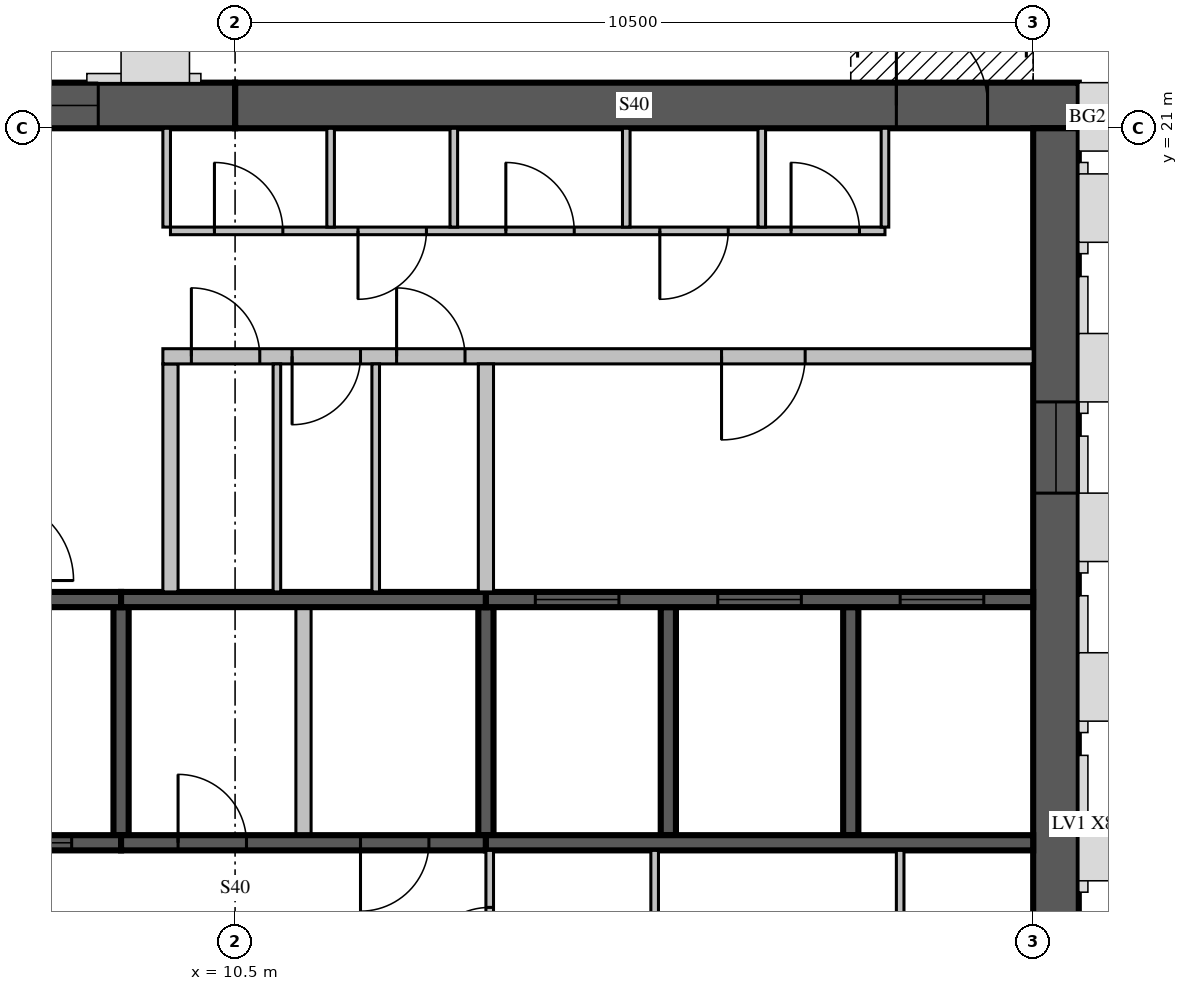
"""IFC4 building model, lengths in metres.
Left out: names, types, materials, properties, quantities, classifications, styles, units other than length and angle.
Written with IfcOpenShell. Run it as: python <this file> out.ifc"""

import sys

from ifc_helpers import new_model, si_unit, direction, frame, frame_2d, origin, place, context, subcontext, project, spatial, rectangle, extrude, source, transform, mapped, element, fill, save


model = new_model("IFC4")
c1 = context("Model", 3, precision=1e-05, world=origin(), true_north=direction((0.0, 1.0)))
c2 = subcontext(c1, "Body", "Model", "MODEL_VIEW")
j1 = project(units=[si_unit("LENGTHUNIT", "METRE"), si_unit("PLANEANGLEUNIT", "RADIAN")], contexts=[c1])
p1 = place(None, origin())
s1 = spatial("IfcSite", under=j1, at=p1, CompositionType="ELEMENT")
p2 = place(p1, origin())
s2 = spatial("IfcBuilding", under=s1, at=p2, CompositionType="ELEMENT")
p3 = place(p2, frame((0.0, 0.0, 316.0)))
s3 = spatial("IfcBuildingStorey", under=s2, at=p3, CompositionType="ELEMENT", Elevation=316.0)
m1 = source(origin(), c2, "Body", "SweptSolid", [
    extrude(rectangle(XDim=11.1, YDim=0.6, at=frame_2d((5.55, 0.0))), origin(), (0.0, 0.0, 1.0), 3.5),
])
p4 = place(p3, frame((10.5, 21.3, 0.0), z_axis=(0.0, 0.0, 1.0), x_axis=(1.0, 0.0, 0.0)))
e1 = element("IfcWall", 1, at=p4, inside=s3, PredefinedType="SHEAR", context=c2, shape_type="MappedRepresentation", body=[
    mapped(m1, transform((0.0, 0.0, 0.0), scale=1.0)),
])
m2 = source(origin(), c2, "Body", "SweptSolid", [
    extrude(rectangle(XDim=1.2, YDim=2.1, at=frame_2d((0.6, 1.05))), frame((0.0, 0.31, 0.0), z_axis=(0.0, -1.0, 0.0), x_axis=(1.0, 0.0, 0.0)), (0.0, 0.0, 1.0), 0.62),
])
p5 = place(p4, frame((8.7, 0.0, 0.0)))
e2 = element("IfcOpeningElement", 2, at=p5, cuts=e1, PredefinedType="OPENING", context=c2, shape_type="MappedRepresentation", body=[
    mapped(m2, transform((0.0, 0.0, 0.0), scale=1.0)),
])
m3 = source(origin(), c2, "Body", "SweptSolid", [
    extrude(rectangle(XDim=10.5, YDim=0.6, at=frame_2d((5.25, 0.0))), origin(), (0.0, 0.0, 1.0), 3.5),
])
p6 = place(p3, frame((21.3, 10.5, 0.0), z_axis=(0.0, 0.0, 1.0), x_axis=(0.0, 1.0, 0.0)))
e3 = element("IfcWall", 3, at=p6, inside=s3, PredefinedType="SHEAR", context=c2, shape_type="MappedRepresentation", body=[
    mapped(m3, transform((0.0, 0.0, 0.0), scale=1.0)),
])
m4 = source(origin(), c2, "Body", "SweptSolid", [
    extrude(rectangle(XDim=1.2, YDim=2.4, at=frame_2d((0.6, 1.2))), frame((0.0, 0.31, 0.0), z_axis=(0.0, -1.0, 0.0), x_axis=(1.0, 0.0, 0.0)), (0.0, 0.0, 1.0), 0.62),
])
p7 = place(p6, frame((5.7, 0.0, 0.6)))
e4 = element("IfcOpeningElement", 4, at=p7, cuts=e3, PredefinedType="OPENING", context=c2, shape_type="MappedRepresentation", body=[
    mapped(m4, transform((0.0, 0.0, 0.0), scale=1.0)),
])
m5 = source(origin(), c2, "Body", "SweptSolid", [
    extrude(rectangle(XDim=6.6, YDim=0.6, at=frame_2d((3.3, 0.0))), origin(), (0.0, 0.0, 1.0), 3.5),
])
p8 = place(p3, frame((3.9, 21.3, 0.0), z_axis=(0.0, 0.0, 1.0), x_axis=(1.0, 0.0, 0.0)))
e5 = element("IfcWall", 5, at=p8, inside=s3, PredefinedType="SHEAR", context=c2, shape_type="MappedRepresentation", body=[
    mapped(m5, transform((0.0, 0.0, 0.0), scale=1.0)),
])
p9 = place(p8, frame((1.5, 0.0, 0.6)))
e6 = element("IfcOpeningElement", 6, at=p9, cuts=e5, PredefinedType="OPENING", context=c2, shape_type="MappedRepresentation", body=[
    mapped(m4, transform((0.0, 0.0, 0.0), scale=1.0)),
])
p10 = place(p8, frame((3.6, 0.0, 0.6)))
e7 = element("IfcOpeningElement", 7, at=p10, cuts=e5, PredefinedType="OPENING", context=c2, shape_type="MappedRepresentation", body=[
    mapped(m4, transform((0.0, 0.0, 0.0), scale=1.0)),
])
m6 = source(origin(), c2, "Body", "SweptSolid", [
    extrude(rectangle(XDim=3.0, YDim=0.2, at=frame_2d((1.5, 0.0))), origin(), (0.0, 0.0, 1.0), 3.1),
])
for number, where, z_axis, x_axis in (
    (8, (9.0, 11.7, 0.0), (0.0, 0.0, 1.0), (0.0, 1.0, 0.0)),
    (9, (13.8, 11.7, 0.0), (0.0, 0.0, 1.0), (0.0, 1.0, 0.0)),
):
    element("IfcWall", number, at=place(p3, frame(where, z_axis=z_axis, x_axis=x_axis)), inside=s3, PredefinedType="SOLIDWALL", context=c2, shape_type="MappedRepresentation", body=[
        mapped(m6, transform((0.0, 0.0, 0.0), scale=1.0)),
    ])
m7 = source(origin(), c2, "Body", "SweptSolid", [
    extrude(rectangle(XDim=3.0, YDim=0.2, at=frame_2d((1.5, 0.0))), origin(), (0.0, 0.0, 1.0), 3.5),
])
for number, where, z_axis, x_axis in (
    (10, (16.2, 11.7, 0.0), (0.0, 0.0, 1.0), (0.0, 1.0, 0.0)),
    (11, (18.6, 11.7, 0.0), (0.0, 0.0, 1.0), (0.0, 1.0, 0.0)),
):
    element("IfcWall", number, at=place(p3, frame(where, z_axis=z_axis, x_axis=x_axis)), inside=s3, PredefinedType="SOLIDWALL", context=c2, shape_type="MappedRepresentation", body=[
        mapped(m7, transform((0.0, 0.0, 0.0), scale=1.0)),
    ])
m8 = source(origin(), c2, "Body", "SweptSolid", [
    extrude(rectangle(XDim=3.0, YDim=0.2, at=frame_2d((1.5, 0.0))), origin(), (0.0, 0.0, 1.0), 3.1),
])
p11 = place(p3, frame((11.4, 11.7, 0.0), z_axis=(0.0, 0.0, 1.0), x_axis=(0.0, 1.0, 0.0)))
e12 = element("IfcWall", 12, at=p11, inside=s3, PredefinedType="PARTITIONING", context=c2, shape_type="MappedRepresentation", body=[
    mapped(m8, transform((0.0, 0.0, 0.0), scale=1.0)),
])
m9 = source(origin(), c2, "Body", "SweptSolid", [
    extrude(rectangle(XDim=4.8, YDim=0.2, at=frame_2d((2.4, 0.0))), origin(), (0.0, 0.0, 1.0), 3.5),
])
p12 = place(p3, frame((4.2, 11.6, 0.0), z_axis=(0.0, 0.0, 1.0), x_axis=(1.0, 0.0, 0.0)))
e13 = element("IfcWall", 13, at=p12, inside=s3, PredefinedType="SOLIDWALL", context=c2, shape_type="MappedRepresentation", body=[
    mapped(m9, transform((0.0, 0.0, 0.0), scale=1.0)),
])
m10 = source(origin(), c2, "Body", "SweptSolid", [
    extrude(rectangle(XDim=1.1, YDim=2.1, at=frame_2d((0.55, 1.05))), frame((0.0, 0.11, 0.0), z_axis=(0.0, -1.0, 0.0), x_axis=(1.0, 0.0, 0.0)), (0.0, 0.0, 1.0), 0.22),
])
p13 = place(p12, frame((0.65, 0.0, 0.0)))
e14 = element("IfcOpeningElement", 14, at=p13, cuts=e13, PredefinedType="OPENING", context=c2, shape_type="MappedRepresentation", body=[
    mapped(m10, transform((0.0, 0.0, 0.0), scale=1.0)),
])
p14 = place(p12, frame((3.05, 0.0, 0.0)))
e15 = element("IfcOpeningElement", 15, at=p14, cuts=e13, PredefinedType="OPENING", context=c2, shape_type="MappedRepresentation", body=[
    mapped(m10, transform((0.0, 0.0, 0.0), scale=1.0)),
])
m11 = source(origin(), c2, "Body", "SweptSolid", [
    extrude(rectangle(XDim=4.8, YDim=0.2, at=frame_2d((2.4, 0.0))), origin(), (0.0, 0.0, 1.0), 3.1),
])
p15 = place(p3, frame((9.0, 11.6, 0.0), z_axis=(0.0, 0.0, 1.0), x_axis=(1.0, 0.0, 0.0)))
e16 = element("IfcWall", 16, at=p15, inside=s3, PredefinedType="SOLIDWALL", context=c2, shape_type="MappedRepresentation", body=[
    mapped(m11, transform((0.0, 0.0, 0.0), scale=1.0)),
])
m12 = source(origin(), c2, "Body", "SweptSolid", [
    extrude(rectangle(XDim=0.9, YDim=2.1, at=frame_2d((0.45, 1.05))), frame((0.0, 0.11, 0.0), z_axis=(0.0, -1.0, 0.0), x_axis=(1.0, 0.0, 0.0)), (0.0, 0.0, 1.0), 0.22),
])
p16 = place(p15, frame((0.75, 0.0, 0.0)))
e17 = element("IfcOpeningElement", 17, at=p16, cuts=e16, PredefinedType="OPENING", context=c2, shape_type="MappedRepresentation", body=[
    mapped(m12, transform((0.0, 0.0, 0.0), scale=1.0)),
])
p17 = place(p15, frame((3.15, 0.0, 0.0)))
e18 = element("IfcOpeningElement", 18, at=p17, cuts=e16, PredefinedType="OPENING", context=c2, shape_type="MappedRepresentation", body=[
    mapped(m12, transform((0.0, 0.0, 0.0), scale=1.0)),
])
m13 = source(origin(), c2, "Body", "SweptSolid", [
    extrude(rectangle(XDim=7.2, YDim=0.2, at=frame_2d((3.6, 0.0))), origin(), (0.0, 0.0, 1.0), 3.5),
])
p18 = place(p3, frame((13.8, 11.6, 0.0), z_axis=(0.0, 0.0, 1.0), x_axis=(1.0, 0.0, 0.0)))
e19 = element("IfcWall", 19, at=p18, inside=s3, PredefinedType="SOLIDWALL", context=c2, shape_type="MappedRepresentation", body=[
    mapped(m13, transform((0.0, 0.0, 0.0), scale=1.0)),
])
p19 = place(p3, frame((4.2, 14.8, 0.0), z_axis=(0.0, 0.0, 1.0), x_axis=(1.0, 0.0, 0.0)))
e20 = element("IfcWall", 20, at=p19, inside=s3, PredefinedType="SOLIDWALL", context=c2, shape_type="MappedRepresentation", body=[
    mapped(m9, transform((0.0, 0.0, 0.0), scale=1.0)),
])
p20 = place(p3, frame((9.0, 14.8, 0.0), z_axis=(0.0, 0.0, 1.0), x_axis=(1.0, 0.0, 0.0)))
e21 = element("IfcWall", 21, at=p20, inside=s3, PredefinedType="SOLIDWALL", context=c2, shape_type="MappedRepresentation", body=[
    mapped(m11, transform((0.0, 0.0, 0.0), scale=1.0)),
])
p21 = place(p3, frame((13.8, 14.8, 0.0), z_axis=(0.0, 0.0, 1.0), x_axis=(1.0, 0.0, 0.0)))
e22 = element("IfcWall", 22, at=p21, inside=s3, PredefinedType="SOLIDWALL", context=c2, shape_type="MappedRepresentation", body=[
    mapped(m13, transform((0.0, 0.0, 0.0), scale=1.0)),
])
p22 = place(p21, frame((0.65, 0.0, 0.0)))
e23 = element("IfcOpeningElement", 23, at=p22, cuts=e22, PredefinedType="OPENING", context=c2, shape_type="MappedRepresentation", body=[
    mapped(m10, transform((0.0, 0.0, 0.0), scale=1.0)),
])
p23 = place(p21, frame((3.05, 0.0, 0.0)))
e24 = element("IfcOpeningElement", 24, at=p23, cuts=e22, PredefinedType="OPENING", context=c2, shape_type="MappedRepresentation", body=[
    mapped(m10, transform((0.0, 0.0, 0.0), scale=1.0)),
])
p24 = place(p21, frame((5.45, 0.0, 0.0)))
e25 = element("IfcOpeningElement", 25, at=p24, cuts=e22, PredefinedType="OPENING", context=c2, shape_type="MappedRepresentation", body=[
    mapped(m10, transform((0.0, 0.0, 0.0), scale=1.0)),
])
p25 = place(p3, frame((9.65, 14.9, 0.0), z_axis=(0.0, 0.0, 1.0), x_axis=(0.0, 1.0, 0.0)))
e26 = element("IfcWall", 26, at=p25, inside=s3, PredefinedType="PARTITIONING", context=c2, shape_type="MappedRepresentation", body=[
    mapped(m8, transform((0.0, 0.0, 0.0), scale=1.0)),
])
m14 = source(origin(), c2, "Body", "SweptSolid", [
    extrude(rectangle(XDim=11.45, YDim=0.2, at=frame_2d((5.725, 0.0))), origin(), (0.0, 0.0, 1.0), 3.1),
])
p26 = place(p3, frame((9.55, 18.0, 0.0), z_axis=(0.0, 0.0, 1.0), x_axis=(1.0, 0.0, 0.0)))
e27 = element("IfcWall", 27, at=p26, inside=s3, PredefinedType="PARTITIONING", context=c2, shape_type="MappedRepresentation", body=[
    mapped(m14, transform((0.0, 0.0, 0.0), scale=1.0)),
])
p27 = place(p26, frame((0.375, 0.0, 0.0)))
e28 = element("IfcOpeningElement", 28, at=p27, cuts=e27, PredefinedType="OPENING", context=c2, shape_type="MappedRepresentation", body=[
    mapped(m12, transform((0.0, 0.0, 0.0), scale=1.0)),
])
p28 = place(p26, frame((1.7, 0.0, 0.0)))
e29 = element("IfcOpeningElement", 29, at=p28, cuts=e27, PredefinedType="OPENING", context=c2, shape_type="MappedRepresentation", body=[
    mapped(m12, transform((0.0, 0.0, 0.0), scale=1.0)),
])
p29 = place(p26, frame((3.075, 0.0, 0.0)))
e30 = element("IfcOpeningElement", 30, at=p29, cuts=e27, PredefinedType="OPENING", context=c2, shape_type="MappedRepresentation", body=[
    mapped(m12, transform((0.0, 0.0, 0.0), scale=1.0)),
])
p30 = place(p26, frame((7.35, 0.0, 0.0)))
e31 = element("IfcOpeningElement", 31, at=p30, cuts=e27, PredefinedType="OPENING", context=c2, shape_type="MappedRepresentation", body=[
    mapped(m10, transform((0.0, 0.0, 0.0), scale=1.0)),
])
m15 = source(origin(), c2, "Body", "SweptSolid", [
    extrude(rectangle(XDim=9.4, YDim=0.1, at=frame_2d((4.7, 0.0))), origin(), (0.0, 0.0, 1.0), 3.1),
])
p31 = place(p3, frame((9.65, 19.65, 0.0), z_axis=(0.0, 0.0, 1.0), x_axis=(1.0, 0.0, 0.0)))
e32 = element("IfcWall", 32, at=p31, inside=s3, PredefinedType="PARTITIONING", context=c2, shape_type="MappedRepresentation", body=[
    mapped(m15, transform((0.0, 0.0, 0.0), scale=1.0)),
])
m16 = source(origin(), c2, "Body", "SweptSolid", [
    extrude(rectangle(XDim=0.9, YDim=2.1, at=frame_2d((0.45, 1.05))), frame((0.0, 0.06, 0.0), z_axis=(0.0, -1.0, 0.0), x_axis=(1.0, 0.0, 0.0)), (0.0, 0.0, 1.0), 0.12),
])
p32 = place(p31, frame((0.578, 0.0, 0.0)))
e33 = element("IfcOpeningElement", 33, at=p32, cuts=e32, PredefinedType="OPENING", context=c2, shape_type="MappedRepresentation", body=[
    mapped(m16, transform((0.0, 0.0, 0.0), scale=1.0)),
])
p33 = place(p31, frame((2.467, 0.0, 0.0)))
e34 = element("IfcOpeningElement", 34, at=p33, cuts=e32, PredefinedType="OPENING", context=c2, shape_type="MappedRepresentation", body=[
    mapped(m16, transform((0.0, 0.0, 0.0), scale=1.0)),
])
p34 = place(p31, frame((4.412, 0.0, 0.0)))
e35 = element("IfcOpeningElement", 35, at=p34, cuts=e32, PredefinedType="OPENING", context=c2, shape_type="MappedRepresentation", body=[
    mapped(m16, transform((0.0, 0.0, 0.0), scale=1.0)),
])
p35 = place(p31, frame((6.438, 0.0, 0.0)))
e36 = element("IfcOpeningElement", 36, at=p35, cuts=e32, PredefinedType="OPENING", context=c2, shape_type="MappedRepresentation", body=[
    mapped(m16, transform((0.0, 0.0, 0.0), scale=1.0)),
])
p36 = place(p31, frame((8.165, 0.0, 0.0)))
e37 = element("IfcOpeningElement", 37, at=p36, cuts=e32, PredefinedType="OPENING", context=c2, shape_type="MappedRepresentation", body=[
    mapped(m16, transform((0.0, 0.0, 0.0), scale=1.0)),
])
m17 = source(origin(), c2, "Body", "SweptSolid", [
    extrude(rectangle(XDim=1.3, YDim=0.1, at=frame_2d((0.65, 0.0))), origin(), (0.0, 0.0, 1.0), 3.1),
])
for number, where, z_axis, x_axis in (
    (38, (11.757, 19.7, 0.0), (0.0, 0.0, 1.0), (0.0, 1.0, 0.0)),
    (39, (13.378, 19.7, 0.0), (0.0, 0.0, 1.0), (0.0, 1.0, 0.0)),
    (40, (15.647, 19.7, 0.0), (0.0, 0.0, 1.0), (0.0, 1.0, 0.0)),
    (41, (17.429, 19.7, 0.0), (0.0, 0.0, 1.0), (0.0, 1.0, 0.0)),
    (42, (9.6, 19.7, 0.0), (0.0, 0.0, 1.0), (0.0, 1.0, 0.0)),
    (43, (19.05, 19.7, 0.0), (0.0, 0.0, 1.0), (0.0, 1.0, 0.0)),
):
    element("IfcWall", number, at=place(p3, frame(where, z_axis=z_axis, x_axis=x_axis)), inside=s3, PredefinedType="PARTITIONING", context=c2, shape_type="MappedRepresentation", body=[
        mapped(m17, transform((0.0, 0.0, 0.0), scale=1.0)),
    ])
m18 = source(origin(), c2, "Body", "SweptSolid", [
    extrude(rectangle(XDim=2.5, YDim=0.1, at=frame_2d((1.25, 0.0))), origin(), (0.0, 0.0, 1.0), 3.1),
])
p37 = place(p3, frame((13.85, 9.0, 0.0), z_axis=(0.0, 0.0, 1.0), x_axis=(0.0, 1.0, 0.0)))
e44 = element("IfcWall", 44, at=p37, inside=s3, PredefinedType="PARTITIONING", context=c2, shape_type="MappedRepresentation", body=[
    mapped(m18, transform((0.0, 0.0, 0.0), scale=1.0)),
])
p38 = place(p37, frame((0.85, 0.0, 0.0)))
e45 = element("IfcOpeningElement", 45, at=p38, cuts=e44, PredefinedType="OPENING", context=c2, shape_type="MappedRepresentation", body=[
    mapped(m16, transform((0.0, 0.0, 0.0), scale=1.0)),
])
m19 = source(origin(), c2, "Body", "SweptSolid", [
    extrude(rectangle(XDim=2.4, YDim=0.1, at=frame_2d((1.2, 0.0))), origin(), (0.0, 0.0, 1.0), 3.1),
])
p39 = place(p3, frame((16.02, 9.1, 0.0), z_axis=(0.0, 0.0, 1.0), x_axis=(0.0, 1.0, 0.0)))
e46 = element("IfcWall", 46, at=p39, inside=s3, PredefinedType="PARTITIONING", context=c2, shape_type="MappedRepresentation", body=[
    mapped(m19, transform((0.0, 0.0, 0.0), scale=1.0)),
])
p40 = place(p3, frame((19.25, 9.0, 0.0), z_axis=(0.0, 0.0, 1.0), x_axis=(0.0, 1.0, 0.0)))
e47 = element("IfcWall", 47, at=p40, inside=s3, PredefinedType="PARTITIONING", context=c2, shape_type="MappedRepresentation", body=[
    mapped(m18, transform((0.0, 0.0, 0.0), scale=1.0)),
])
p41 = place(p3, frame((13.8, 14.9, 0.0), z_axis=(0.0, 0.0, 1.0), x_axis=(0.0, 1.0, 0.0)))
e48 = element("IfcWall", 48, at=p41, inside=s3, PredefinedType="PARTITIONING", context=c2, shape_type="MappedRepresentation", body=[
    mapped(m8, transform((0.0, 0.0, 0.0), scale=1.0)),
])
m20 = source(origin(), c2, "Body", "SweptSolid", [
    extrude(rectangle(XDim=3.0, YDim=0.1, at=frame_2d((1.5, 0.0))), origin(), (0.0, 0.0, 1.0), 3.1),
])
for number, where, z_axis, x_axis in (
    (49, (11.05, 14.9, 0.0), (0.0, 0.0, 1.0), (0.0, 1.0, 0.0)),
    (50, (12.35, 14.9, 0.0), (0.0, 0.0, 1.0), (0.0, 1.0, 0.0)),
):
    element("IfcWall", number, at=place(p3, frame(where, z_axis=z_axis, x_axis=x_axis)), inside=s3, PredefinedType="PARTITIONING", context=c2, shape_type="MappedRepresentation", body=[
        mapped(m20, transform((0.0, 0.0, 0.0), scale=1.0)),
    ])
m21 = source(origin(), c2, "Body", "SweptSolid", [
    extrude(rectangle(XDim=1.1, YDim=2.1, at=frame_2d((0.55, 1.05))), frame((0.0, 0.025, 0.0), z_axis=(0.0, -1.0, 0.0), x_axis=(1.0, 0.0, 0.0)), (0.0, 0.0, 1.0), 0.05),
])
p42 = place(p14, origin())
e51 = element("IfcDoor", 51, at=p42, inside=s3, OperationType="SLIDING_TO_LEFT", PredefinedType="DOOR", context=c2, shape_type="MappedRepresentation", body=[
    mapped(m21, transform((0.0, 0.0, 0.0), scale=1.0)),
])
fill(e15, e51)
m22 = source(origin(), c2, "Body", "SweptSolid", [
    extrude(rectangle(XDim=0.9, YDim=2.1, at=frame_2d((0.45, 1.05))), frame((0.0, 0.025, 0.0), z_axis=(0.0, -1.0, 0.0), x_axis=(1.0, 0.0, 0.0)), (0.0, 0.0, 1.0), 0.05),
])
p43 = place(p16, origin())
e52 = element("IfcDoor", 52, at=p43, inside=s3, OperationType="SINGLE_SWING_LEFT", PredefinedType="DOOR", context=c2, shape_type="MappedRepresentation", body=[
    mapped(m22, transform((0.0, 0.0, 0.0), scale=1.0)),
])
fill(e17, e52)
p44 = place(p17, origin())
e53 = element("IfcDoor", 53, at=p44, inside=s3, OperationType="SINGLE_SWING_RIGHT", PredefinedType="DOOR", context=c2, shape_type="MappedRepresentation", body=[
    mapped(m22, transform((0.0, 0.0, 0.0), scale=1.0)),
])
fill(e18, e53)
p45 = place(p22, origin())
e54 = element("IfcDoor", 54, at=p45, inside=s3, OperationType="SLIDING_TO_LEFT", PredefinedType="DOOR", context=c2, shape_type="MappedRepresentation", body=[
    mapped(m21, transform((0.0, 0.0, 0.0), scale=1.0)),
])
fill(e23, e54)
p46 = place(p23, origin())
e55 = element("IfcDoor", 55, at=p46, inside=s3, OperationType="SLIDING_TO_LEFT", PredefinedType="DOOR", context=c2, shape_type="MappedRepresentation", body=[
    mapped(m21, transform((0.0, 0.0, 0.0), scale=1.0)),
])
fill(e24, e55)
p47 = place(p24, origin())
e56 = element("IfcDoor", 56, at=p47, inside=s3, OperationType="SLIDING_TO_LEFT", PredefinedType="DOOR", context=c2, shape_type="MappedRepresentation", body=[
    mapped(m21, transform((0.0, 0.0, 0.0), scale=1.0)),
])
fill(e25, e56)
p48 = place(p27, origin())
e57 = element("IfcDoor", 57, at=p48, inside=s3, OperationType="SINGLE_SWING_LEFT", PredefinedType="DOOR", context=c2, shape_type="MappedRepresentation", body=[
    mapped(m22, transform((0.0, 0.0, 0.0), scale=1.0)),
])
fill(e28, e57)
p49 = place(p28, origin())
e58 = element("IfcDoor", 58, at=p49, inside=s3, OperationType="SINGLE_SWING_RIGHT", PredefinedType="DOOR", context=c2, shape_type="MappedRepresentation", body=[
    mapped(m22, transform((0.0, 0.0, 0.0), scale=1.0)),
])
fill(e29, e58)
p50 = place(p29, origin())
e59 = element("IfcDoor", 59, at=p50, inside=s3, OperationType="SINGLE_SWING_LEFT", PredefinedType="DOOR", context=c2, shape_type="MappedRepresentation", body=[
    mapped(m22, transform((0.0, 0.0, 0.0), scale=1.0)),
])
fill(e30, e59)
p51 = place(p30, origin())
e60 = element("IfcDoor", 60, at=p51, inside=s3, OperationType="SINGLE_SWING_RIGHT", PredefinedType="DOOR", context=c2, shape_type="MappedRepresentation", body=[
    mapped(m21, transform((0.0, 0.0, 0.0), scale=1.0)),
])
fill(e31, e60)
p52 = place(p32, origin())
e61 = element("IfcDoor", 61, at=p52, inside=s3, OperationType="SINGLE_SWING_LEFT", PredefinedType="DOOR", context=c2, shape_type="MappedRepresentation", body=[
    mapped(m22, transform((0.0, 0.0, 0.0), scale=1.0)),
])
fill(e33, e61)
p53 = place(p33, origin())
e62 = element("IfcDoor", 62, at=p53, inside=s3, OperationType="SINGLE_SWING_RIGHT", PredefinedType="DOOR", context=c2, shape_type="MappedRepresentation", body=[
    mapped(m22, transform((0.0, 0.0, 0.0), scale=1.0)),
])
fill(e34, e62)
p54 = place(p34, origin())
e63 = element("IfcDoor", 63, at=p54, inside=s3, OperationType="SINGLE_SWING_LEFT", PredefinedType="DOOR", context=c2, shape_type="MappedRepresentation", body=[
    mapped(m22, transform((0.0, 0.0, 0.0), scale=1.0)),
])
fill(e35, e63)
p55 = place(p35, origin())
e64 = element("IfcDoor", 64, at=p55, inside=s3, OperationType="SINGLE_SWING_RIGHT", PredefinedType="DOOR", context=c2, shape_type="MappedRepresentation", body=[
    mapped(m22, transform((0.0, 0.0, 0.0), scale=1.0)),
])
fill(e36, e64)
p56 = place(p36, origin())
e65 = element("IfcDoor", 65, at=p56, inside=s3, OperationType="SINGLE_SWING_LEFT", PredefinedType="DOOR", context=c2, shape_type="MappedRepresentation", body=[
    mapped(m22, transform((0.0, 0.0, 0.0), scale=1.0)),
])
fill(e37, e65)
p57 = place(p38, origin())
e66 = element("IfcDoor", 66, at=p57, inside=s3, OperationType="SINGLE_SWING_LEFT", PredefinedType="DOOR", context=c2, shape_type="MappedRepresentation", body=[
    mapped(m22, transform((0.0, 0.0, 0.0), scale=1.0)),
])
fill(e45, e66)
m23 = source(origin(), c2, "Body", "SweptSolid", [
    extrude(rectangle(XDim=1.2, YDim=2.1, at=frame_2d((0.6, 1.05))), frame((0.0, 0.025, 0.0), z_axis=(0.0, -1.0, 0.0), x_axis=(1.0, 0.0, 0.0)), (0.0, 0.0, 1.0), 0.05),
])
p58 = place(p5, origin())
e67 = element("IfcDoor", 67, at=p58, inside=s3, OperationType="SINGLE_SWING_LEFT", PredefinedType="DOOR", context=c2, shape_type="MappedRepresentation", body=[
    mapped(m23, transform((0.0, 0.0, 0.0), scale=1.0)),
])
fill(e2, e67)
m24 = source(origin(), c2, "Body", "SweptSolid", [
    extrude(rectangle(XDim=1.2, YDim=2.4, at=frame_2d((0.6, 1.2))), frame((0.0, 0.03, 0.0), z_axis=(0.0, -1.0, 0.0), x_axis=(1.0, 0.0, 0.0)), (0.0, 0.0, 1.0), 0.06),
])
p59 = place(p7, origin())
e68 = element("IfcWindow", 68, at=p59, inside=s3, PartitioningType="SINGLE_PANEL", PredefinedType="WINDOW", context=c2, shape_type="MappedRepresentation", body=[
    mapped(m24, transform((0.0, 0.0, 0.0), scale=1.0)),
])
fill(e4, e68)
p60 = place(p10, origin())
e69 = element("IfcWindow", 69, at=p60, inside=s3, PartitioningType="SINGLE_PANEL", PredefinedType="WINDOW", context=c2, shape_type="MappedRepresentation", body=[
    mapped(m24, transform((0.0, 0.0, 0.0), scale=1.0)),
])
fill(e7, e69)
save(model, sys.argv[1])
